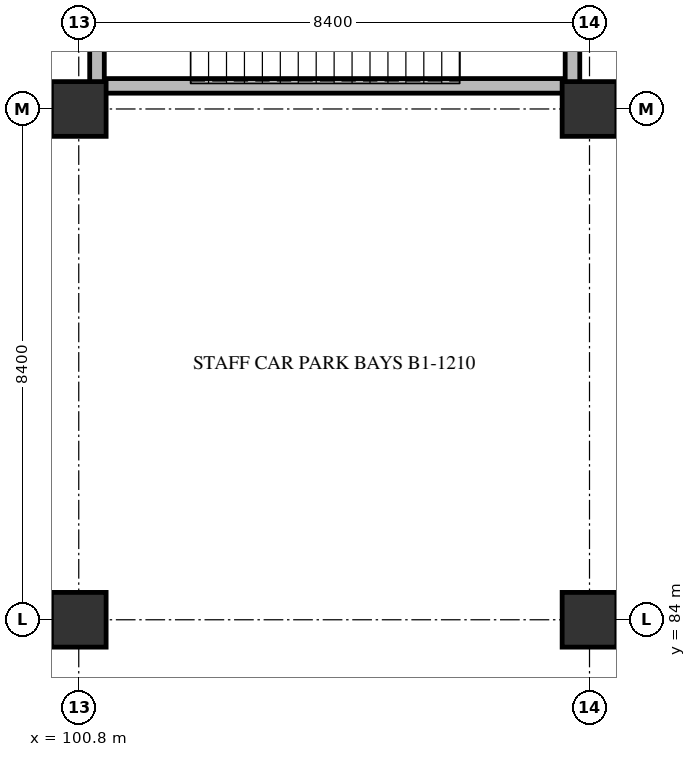
"""IFC4 building model, lengths in metres.
Left out: names, types, materials, properties, quantities, classifications, styles, units other than length and angle.
Written with IfcOpenShell. Run it as: python <this file> out.ifc"""

import sys

from ifc_helpers import new_model, si_unit, direction, frame, frame_2d, origin, origin_2d, place, context, subcontext, project, spatial, rectangle, extrude, element, save


model = new_model("IFC4")
c1 = context("Model", 3, precision=1e-05, world=origin(), true_north=direction((0.0, 1.0)))
c2 = subcontext(c1, "Body", "Model", "MODEL_VIEW")
j1 = project(units=[si_unit("LENGTHUNIT", "METRE"), si_unit("PLANEANGLEUNIT", "RADIAN")], contexts=[c1])
p1 = place(None, origin())
s1 = spatial("IfcSite", under=j1, at=p1, CompositionType="ELEMENT")
p2 = place(p1, origin())
s2 = spatial("IfcBuilding", under=s1, at=p2, CompositionType="ELEMENT")
p3 = place(p2, frame((0.0, 0.0, -5.4)))
s3 = spatial("IfcBuildingStorey", under=s2, at=p3, CompositionType="ELEMENT", Elevation=-5.4)
for number, where, z_axis, x_axis in (
    (1, (100.8, 84.0, 0.0), (0.0, 0.0, 1.0), (1.0, 0.0, 0.0)),
    (2, (100.8, 92.4, 0.0), (0.0, 0.0, 1.0), (1.0, 0.0, 0.0)),
    (3, (109.2, 84.0, 0.0), (0.0, 0.0, 1.0), (1.0, 0.0, 0.0)),
    (4, (109.2, 92.4, 0.0), (0.0, 0.0, 1.0), (1.0, 0.0, 0.0)),
):
    element("IfcColumn", number, at=place(p3, frame(where, z_axis=z_axis, x_axis=x_axis)), inside=s3, PredefinedType="COLUMN", context=c2, shape_type="SweptSolid", body=[
        extrude(rectangle(XDim=0.9, YDim=0.9, at=origin_2d()), origin(), (0.0, 0.0, 1.0), 5.4),
    ])
p4 = place(p3, frame((101.1, 92.78, 0.0), z_axis=(0.0, 0.0, 1.0), x_axis=(1.0, 0.0, 0.0)))
e5 = element("IfcWall", 5, at=p4, inside=s3, PredefinedType="SHEAR", context=c2, shape_type="SweptSolid", body=[
    extrude(rectangle(XDim=7.82, YDim=0.24, at=frame_2d((3.91, 0.0))), origin(), (0.0, 0.0, 1.0), 5.08),
])
for number, where, z_axis, x_axis in (
    (6, (101.1, 92.78, 0.0), (0.0, 0.0, 1.0), (0.0, 1.0, 0.0)),
    (7, (108.92, 92.78, 0.0), (0.0, 0.0, 1.0), (0.0, 1.0, 0.0)),
):
    element("IfcWall", number, at=place(p3, frame(where, z_axis=z_axis, x_axis=x_axis)), inside=s3, PredefinedType="SHEAR", context=c2, shape_type="SweptSolid", body=[
        extrude(rectangle(XDim=3.32, YDim=0.24, at=frame_2d((1.66, 0.0))), origin(), (0.0, 0.0, 1.0), 5.08),
    ])
save(model, sys.argv[1])
